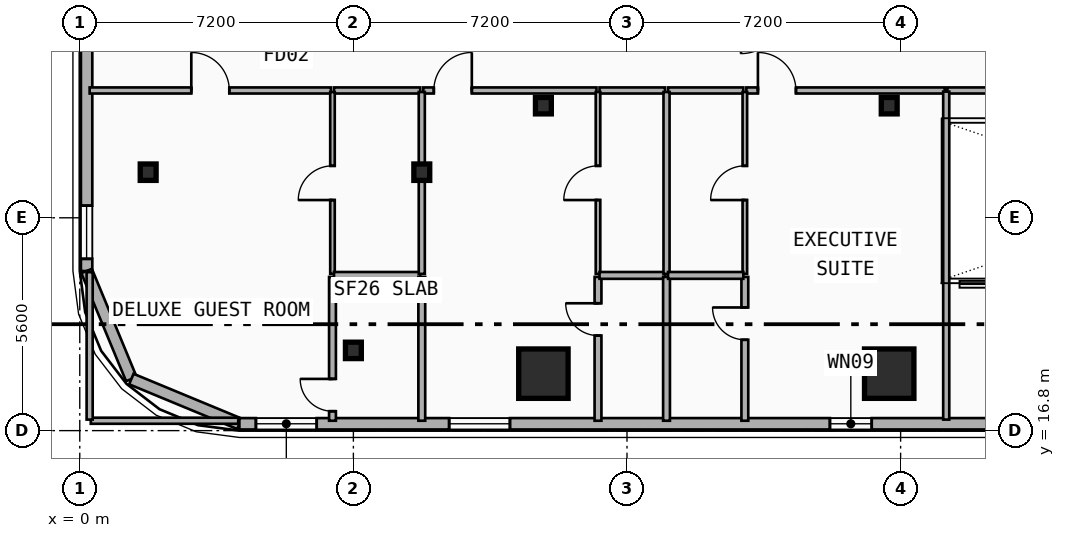
"""IFC4 building model, lengths in metres.
Left out: names, types, materials, properties, quantities, classifications, styles, units other than length and angle.
Written with IfcOpenShell. Run it as: python <this file> out.ifc"""

import sys

from ifc_helpers import new_model, si_unit, direction, frame, frame_2d, origin, origin_2d, place, context, subcontext, project, spatial, rectangle, i_section, extrude, element, fill, save


model = new_model("IFC4")
c1 = context("Model", 3, precision=1e-05, world=origin(), true_north=direction((0.0, 1.0)))
c2 = subcontext(c1, "Body", "Model", "MODEL_VIEW")
j1 = project(units=[si_unit("LENGTHUNIT", "METRE"), si_unit("PLANEANGLEUNIT", "RADIAN")], contexts=[c1])
p1 = place(None, origin())
s1 = spatial("IfcSite", under=j1, at=p1, CompositionType="ELEMENT")
p2 = place(p1, origin())
s2 = spatial("IfcBuilding", under=s1, at=p2, CompositionType="ELEMENT")
p3 = place(p2, frame((0.0, 0.0, 86.3)))
s3 = spatial("IfcBuildingStorey", under=s2, at=p3, CompositionType="ELEMENT", Elevation=86.3)
for number, where, z_axis, x_axis in (
    (1, (12.2, 25.35, 0.0), (0.0, 0.0, 1.0), (1.0, 0.0, 0.0)),
    (2, (21.3, 25.35, 0.0), (0.0, 0.0, 1.0), (1.0, 0.0, 0.0)),
):
    element("IfcColumn", number, at=place(p3, frame(where, z_axis=z_axis, x_axis=x_axis)), inside=s3, PredefinedType="COLUMN", context=c2, shape_type="SweptSolid", body=[
        extrude(i_section(OverallWidth=0.418, OverallDepth=0.432, WebThickness=0.035, FlangeThickness=0.056, FilletRadius=0.015, at=origin_2d()), origin(), (0.0, 0.0, 1.0), 3.5),
    ])
for number, where, z_axis, x_axis in (
    (3, (12.2, 18.407, 0.0), (0.0, -0.09, 0.996), (1.0, 0.0, 0.0)),
    (4, (21.3, 18.407, 0.0), (0.0, -0.09, 0.996), (1.0, 0.0, 0.0)),
):
    element("IfcColumn", number, at=place(p3, frame(where, z_axis=z_axis, x_axis=x_axis)), inside=s3, PredefinedType="COLUMN", context=c2, shape_type="SweptSolid", body=[
        extrude(rectangle(XDim=1.3, YDim=1.3, at=origin_2d()), origin(), (0.0, 0.0, 1.0), 3.514),
    ])
for number, where, z_axis, x_axis in (
    (5, (9.0, 23.6, 0.0), (0.0, 0.0, 1.0), (1.0, 0.0, 0.0)),
    (6, (1.8, 23.6, 0.0), (0.0, 0.0, 1.0), (1.0, 0.0, 0.0)),
):
    element("IfcColumn", number, at=place(p3, frame(where, z_axis=z_axis, x_axis=x_axis)), inside=s3, PredefinedType="COLUMN", context=c2, shape_type="SweptSolid", body=[
        extrude(i_section(OverallWidth=0.418, OverallDepth=0.432, WebThickness=0.035, FlangeThickness=0.056, FilletRadius=0.015, at=origin_2d()), origin(), (0.0, 0.0, 1.0), 3.5),
    ])
p4 = place(p3, frame((7.2, 19.008, 0.0), z_axis=(0.0, -0.079960777917, 0.996798010629), x_axis=(1.0, 0.0, 0.0)))
e7 = element("IfcColumn", 7, at=p4, inside=s3, PredefinedType="COLUMN", context=c2, shape_type="SweptSolid", body=[
    extrude(i_section(OverallWidth=0.418, OverallDepth=0.432, WebThickness=0.035, FlangeThickness=0.056, FilletRadius=0.015, at=origin_2d()), origin(), (0.0, 0.0, 1.0), 3.511),
])
p5 = place(p3, frame((0.18, 21.0, 0.0), z_axis=(0.0, 0.0, 1.0), x_axis=(0.0, 1.0, 0.0)))
e8 = element("IfcWall", 8, at=p5, inside=s3, PredefinedType="SOLIDWALL", context=c2, shape_type="SweptSolid", body=[
    extrude(rectangle(XDim=18.0, YDim=0.3, at=frame_2d((9.0, 0.0))), origin(), (0.0, 0.0, 1.0), 3.24),
])
p6 = place(p5, frame((7.47, 0.0, 0.48)))
e9 = element("IfcOpeningElement", 9, at=p6, cuts=e8, PredefinedType="OPENING", context=c2, shape_type="SweptSolid", body=[
    extrude(rectangle(XDim=1.4, YDim=1.8, at=frame_2d((0.7, 0.9))), frame((0.0, 0.16, 0.0), z_axis=(0.0, -1.0, 0.0), x_axis=(1.0, 0.0, 0.0)), (0.0, 0.0, 1.0), 0.32),
])
p7 = place(p5, frame((12.509, 0.0, 0.48)))
e10 = element("IfcOpeningElement", 10, at=p7, cuts=e8, PredefinedType="OPENING", context=c2, shape_type="SweptSolid", body=[
    extrude(rectangle(XDim=1.4, YDim=1.8, at=frame_2d((0.7, 0.9))), frame((0.0, 0.16, 0.0), z_axis=(0.0, -1.0, 0.0), x_axis=(1.0, 0.0, 0.0)), (0.0, 0.0, 1.0), 0.32),
])
p8 = place(p5, frame((0.32, 0.0, 0.65)))
e11 = element("IfcOpeningElement", 11, at=p8, cuts=e8, PredefinedType="OPENING", context=c2, shape_type="SweptSolid", body=[
    extrude(rectangle(XDim=1.4, YDim=1.8, at=frame_2d((0.7, 0.9))), frame((0.0, 0.16, 0.0), z_axis=(0.0, -1.0, 0.0), x_axis=(1.0, 0.0, 0.0)), (0.0, 0.0, 1.0), 0.32),
])
for number, where, z_axis, x_axis in (
    (12, (1.357, 18.157, 0.0), (0.0, 0.0, 1.0), (-0.383, 0.924, 0.0)),
    (13, (4.2, 16.98, 0.0), (0.0, 0.0, 1.0), (-0.924, 0.383, 0.0)),
):
    element("IfcWall", number, at=place(p3, frame(where, z_axis=z_axis, x_axis=x_axis)), inside=s3, PredefinedType="SOLIDWALL", context=c2, shape_type="SweptSolid", body=[
        extrude(rectangle(XDim=3.077, YDim=0.3, at=frame_2d((1.538, 0.0))), origin(), (0.0, 0.0, 1.0), 3.24),
    ])
p9 = place(p3, frame((53.4, 16.98, 0.0), z_axis=(0.0, 0.0, 1.0), x_axis=(-1.0, 0.0, 0.0)))
e14 = element("IfcWall", 14, at=p9, inside=s3, PredefinedType="SOLIDWALL", context=c2, shape_type="SweptSolid", body=[
    extrude(rectangle(XDim=49.2, YDim=0.3, at=frame_2d((24.6, 0.0))), origin(), (0.0, 0.0, 1.0), 3.24),
])
p10 = place(p9, frame((47.165, 0.0, 0.48)))
e15 = element("IfcOpeningElement", 15, at=p10, cuts=e14, PredefinedType="OPENING", context=c2, shape_type="SweptSolid", body=[
    extrude(rectangle(XDim=1.6, YDim=1.95, at=frame_2d((0.8, 0.975))), frame((0.0, 0.16, 0.0), z_axis=(0.0, -1.0, 0.0), x_axis=(1.0, 0.0, 0.0)), (0.0, 0.0, 1.0), 0.32),
])
p11 = place(p9, frame((42.08, 0.0, 0.8)))
e16 = element("IfcOpeningElement", 16, at=p11, cuts=e14, PredefinedType="OPENING", context=c2, shape_type="SweptSolid", body=[
    extrude(rectangle(XDim=1.6, YDim=1.95, at=frame_2d((0.8, 0.975))), frame((0.0, 0.16, 0.0), z_axis=(0.0, -1.0, 0.0), x_axis=(1.0, 0.0, 0.0)), (0.0, 0.0, 1.0), 0.32),
])
p12 = place(p9, frame((32.561, 0.0, 1.05)))
e17 = element("IfcOpeningElement", 17, at=p12, cuts=e14, PredefinedType="OPENING", context=c2, shape_type="SweptSolid", body=[
    extrude(rectangle(XDim=1.1, YDim=1.05, at=frame_2d((0.55, 0.525))), frame((0.0, 0.16, 0.0), z_axis=(0.0, -1.0, 0.0), x_axis=(1.0, 0.0, 0.0)), (0.0, 0.0, 1.0), 0.32),
])
p13 = place(p9, frame((15.189, 0.0, 0.34)))
e18 = element("IfcOpeningElement", 18, at=p13, cuts=e14, PredefinedType="OPENING", context=c2, shape_type="SweptSolid", body=[
    extrude(rectangle(XDim=1.4, YDim=1.8, at=frame_2d((0.7, 0.9))), frame((0.0, 0.16, 0.0), z_axis=(0.0, -1.0, 0.0), x_axis=(1.0, 0.0, 0.0)), (0.0, 0.0, 1.0), 0.32),
])
p14 = place(p9, frame((5.52, 0.0, 0.8)))
e19 = element("IfcOpeningElement", 19, at=p14, cuts=e14, PredefinedType="OPENING", context=c2, shape_type="SweptSolid", body=[
    extrude(rectangle(XDim=1.6, YDim=1.95, at=frame_2d((0.8, 0.975))), frame((0.0, 0.16, 0.0), z_axis=(0.0, -1.0, 0.0), x_axis=(1.0, 0.0, 0.0)), (0.0, 0.0, 1.0), 0.32),
])
p15 = place(p9, frame((0.435, 0.0, 0.48)))
e20 = element("IfcOpeningElement", 20, at=p15, cuts=e14, PredefinedType="OPENING", context=c2, shape_type="SweptSolid", body=[
    extrude(rectangle(XDim=1.6, YDim=1.95, at=frame_2d((0.8, 0.975))), frame((0.0, 0.16, 0.0), z_axis=(0.0, -1.0, 0.0), x_axis=(1.0, 0.0, 0.0)), (0.0, 0.0, 1.0), 0.32),
])
p16 = place(p3, frame((0.26, 25.75, 0.0), z_axis=(0.0, 0.0, 1.0), x_axis=(1.0, 0.0, 0.0)))
e21 = element("IfcWall", 21, at=p16, inside=s3, PredefinedType="PARTITIONING", context=c2, shape_type="SweptSolid", body=[
    extrude(rectangle(XDim=6.35, YDim=0.16, at=frame_2d((3.175, 0.0))), origin(), (0.0, 0.0, 1.0), 2.57),
])
p17 = place(p16, frame((2.675, 0.0, 0.0)))
e22 = element("IfcOpeningElement", 22, at=p17, cuts=e21, PredefinedType="OPENING", context=c2, shape_type="SweptSolid", body=[
    extrude(rectangle(XDim=1.0, YDim=2.15, at=frame_2d((0.5, 1.075))), frame((0.0, 0.09, 0.0), z_axis=(0.0, -1.0, 0.0), x_axis=(1.0, 0.0, 0.0)), (0.0, 0.0, 1.0), 0.18),
])
p18 = place(p3, frame((6.69, 25.75, 0.0), z_axis=(0.0, 0.0, 1.0), x_axis=(1.0, 0.0, 0.0)))
e23 = element("IfcWall", 23, at=p18, inside=s3, PredefinedType="PARTITIONING", context=c2, shape_type="SweptSolid", body=[
    extrude(rectangle(XDim=2.27, YDim=0.16, at=frame_2d((1.135, 0.0))), origin(), (0.0, 0.0, 1.0), 2.57),
])
p19 = place(p3, frame((9.04, 25.75, 0.0), z_axis=(0.0, 0.0, 1.0), x_axis=(1.0, 0.0, 0.0)))
e24 = element("IfcWall", 24, at=p19, inside=s3, PredefinedType="PARTITIONING", context=c2, shape_type="SweptSolid", body=[
    extrude(rectangle(XDim=4.557, YDim=0.16, at=frame_2d((2.278, 0.0))), origin(), (0.0, 0.0, 1.0), 2.31),
])
p20 = place(p19, frame((0.277, 0.0, 0.0)))
e25 = element("IfcOpeningElement", 25, at=p20, cuts=e24, PredefinedType="OPENING", context=c2, shape_type="SweptSolid", body=[
    extrude(rectangle(XDim=1.0, YDim=2.15, at=frame_2d((0.5, 1.075))), frame((0.0, 0.09, 0.0), z_axis=(0.0, -1.0, 0.0), x_axis=(1.0, 0.0, 0.0)), (0.0, 0.0, 1.0), 0.18),
])
p21 = place(p3, frame((13.677, 25.75, 0.0), z_axis=(0.0, 0.0, 1.0), x_axis=(1.0, 0.0, 0.0)))
e26 = element("IfcWall", 26, at=p21, inside=s3, PredefinedType="PARTITIONING", context=c2, shape_type="SweptSolid", body=[
    extrude(rectangle(XDim=1.723, YDim=0.16, at=frame_2d((0.861, 0.0))), origin(), (0.0, 0.0, 1.0), 3.24),
])
p22 = place(p3, frame((17.541, 25.75, 0.0), z_axis=(0.0, 0.0, 1.0), x_axis=(1.0, 0.0, 0.0)))
e27 = element("IfcWall", 27, at=p22, inside=s3, PredefinedType="PARTITIONING", context=c2, shape_type="SweptSolid", body=[
    extrude(rectangle(XDim=5.219, YDim=0.16, at=frame_2d((2.609, 0.0))), origin(), (0.0, 0.0, 1.0), 2.31),
])
p23 = place(p22, frame((0.304, 0.0, 0.0)))
e28 = element("IfcOpeningElement", 28, at=p23, cuts=e27, PredefinedType="OPENING", context=c2, shape_type="SweptSolid", body=[
    extrude(rectangle(XDim=1.0, YDim=2.15, at=frame_2d((0.5, 1.075))), frame((0.0, 0.09, 0.0), z_axis=(0.0, -1.0, 0.0), x_axis=(1.0, 0.0, 0.0)), (0.0, 0.0, 1.0), 0.18),
])
p24 = place(p3, frame((15.48, 25.75, 0.0), z_axis=(0.0, 0.0, 1.0), x_axis=(1.0, 0.0, 0.0)))
e29 = element("IfcWall", 29, at=p24, inside=s3, PredefinedType="PARTITIONING", context=c2, shape_type="SweptSolid", body=[
    extrude(rectangle(XDim=1.981, YDim=0.16, at=frame_2d((0.99, 0.0))), origin(), (0.0, 0.0, 1.0), 3.24),
])
p25 = place(p3, frame((6.65, 17.06, 0.0), z_axis=(0.0, 0.0, 1.0), x_axis=(0.0, 1.0, 0.0)))
e30 = element("IfcWall", 30, at=p25, inside=s3, PredefinedType="PLUMBINGWALL", context=c2, shape_type="SweptSolid", body=[
    extrude(rectangle(XDim=3.784, YDim=0.18, at=frame_2d((1.892, 0.0))), origin(), (0.0, 0.0, 1.0), 2.57),
])
p26 = place(p25, frame((0.25, 0.0, 0.0)))
e31 = element("IfcOpeningElement", 31, at=p26, cuts=e30, PredefinedType="OPENING", context=c2, shape_type="SweptSolid", body=[
    extrude(rectangle(XDim=0.85, YDim=2.1, at=frame_2d((0.425, 1.05))), frame((0.0, 0.1, 0.0), z_axis=(0.0, -1.0, 0.0), x_axis=(1.0, 0.0, 0.0)), (0.0, 0.0, 1.0), 0.2),
])
p27 = place(p3, frame((6.65, 20.924, 0.0), z_axis=(0.0, 0.0, 1.0), x_axis=(0.0, 1.0, 0.0)))
e32 = element("IfcWall", 32, at=p27, inside=s3, PredefinedType="PARTITIONING", context=c2, shape_type="SweptSolid", body=[
    extrude(rectangle(XDim=4.786, YDim=0.12, at=frame_2d((2.393, 0.0))), origin(), (0.0, 0.0, 1.0), 2.57),
])
p28 = place(p27, frame((1.943, 0.0, 0.0)))
e33 = element("IfcOpeningElement", 33, at=p28, cuts=e32, PredefinedType="OPENING", context=c2, shape_type="SweptSolid", body=[
    extrude(rectangle(XDim=0.9, YDim=2.1, at=frame_2d((0.45, 1.05))), frame((0.0, 0.07, 0.0), z_axis=(0.0, -1.0, 0.0), x_axis=(1.0, 0.0, 0.0)), (0.0, 0.0, 1.0), 0.14),
])
p29 = place(p3, frame((6.69, 20.884, 0.0), z_axis=(0.0, 0.0, 1.0), x_axis=(1.0, 0.0, 0.0)))
e34 = element("IfcWall", 34, at=p29, inside=s3, PredefinedType="PLUMBINGWALL", context=c2, shape_type="SweptSolid", body=[
    extrude(rectangle(XDim=2.27, YDim=0.18, at=frame_2d((1.135, 0.0))), origin(), (0.0, 0.0, 1.0), 2.57),
])
p30 = place(p3, frame((9.0, 17.06, 0.0), z_axis=(0.0, 0.0, 1.0), x_axis=(0.0, 1.0, 0.0)))
e35 = element("IfcWall", 35, at=p30, inside=s3, PredefinedType="PLUMBINGWALL", context=c2, shape_type="SweptSolid", body=[
    extrude(rectangle(XDim=3.784, YDim=0.18, at=frame_2d((1.892, 0.0))), origin(), (0.0, 0.0, 1.0), 2.72),
])
p31 = place(p3, frame((9.0, 20.924, 0.0), z_axis=(0.0, 0.0, 1.0), x_axis=(0.0, 1.0, 0.0)))
e36 = element("IfcWall", 36, at=p31, inside=s3, PredefinedType="PARTITIONING", context=c2, shape_type="SweptSolid", body=[
    extrude(rectangle(XDim=4.786, YDim=0.16, at=frame_2d((2.393, 0.0))), origin(), (0.0, 0.0, 1.0), 2.72),
])
p32 = place(p3, frame((13.637, 17.06, 0.0), z_axis=(0.0, 0.0, 1.0), x_axis=(0.0, 1.0, 0.0)))
e37 = element("IfcWall", 37, at=p32, inside=s3, PredefinedType="PLUMBINGWALL", context=c2, shape_type="SweptSolid", body=[
    extrude(rectangle(XDim=3.784, YDim=0.18, at=frame_2d((1.892, 0.0))), origin(), (0.0, 0.0, 1.0), 2.82),
])
p33 = place(p32, frame((2.241, 0.0, 0.0)))
e38 = element("IfcOpeningElement", 38, at=p33, cuts=e37, PredefinedType="OPENING", context=c2, shape_type="SweptSolid", body=[
    extrude(rectangle(XDim=0.85, YDim=2.1, at=frame_2d((0.425, 1.05))), frame((0.0, 0.1, 0.0), z_axis=(0.0, -1.0, 0.0), x_axis=(1.0, 0.0, 0.0)), (0.0, 0.0, 1.0), 0.2),
])
p34 = place(p3, frame((13.637, 20.924, 0.0), z_axis=(0.0, 0.0, 1.0), x_axis=(0.0, 1.0, 0.0)))
e39 = element("IfcWall", 39, at=p34, inside=s3, PredefinedType="PARTITIONING", context=c2, shape_type="SweptSolid", body=[
    extrude(rectangle(XDim=4.786, YDim=0.12, at=frame_2d((2.393, 0.0))), origin(), (0.0, 0.0, 1.0), 2.72),
])
p35 = place(p34, frame((1.943, 0.0, 0.0)))
e40 = element("IfcOpeningElement", 40, at=p35, cuts=e39, PredefinedType="OPENING", context=c2, shape_type="SweptSolid", body=[
    extrude(rectangle(XDim=0.9, YDim=2.1, at=frame_2d((0.45, 1.05))), frame((0.0, 0.07, 0.0), z_axis=(0.0, -1.0, 0.0), x_axis=(1.0, 0.0, 0.0)), (0.0, 0.0, 1.0), 0.14),
])
p36 = place(p3, frame((13.677, 20.884, 0.0), z_axis=(0.0, 0.0, 1.0), x_axis=(1.0, 0.0, 0.0)))
e41 = element("IfcWall", 41, at=p36, inside=s3, PredefinedType="PLUMBINGWALL", context=c2, shape_type="SweptSolid", body=[
    extrude(rectangle(XDim=1.723, YDim=0.18, at=frame_2d((0.861, 0.0))), origin(), (0.0, 0.0, 1.0), 2.87),
])
p37 = place(p3, frame((15.44, 17.06, 0.0), z_axis=(0.0, 0.0, 1.0), x_axis=(0.0, 1.0, 0.0)))
e42 = element("IfcWall", 42, at=p37, inside=s3, PredefinedType="PLUMBINGWALL", context=c2, shape_type="SweptSolid", body=[
    extrude(rectangle(XDim=3.784, YDim=0.18, at=frame_2d((1.892, 0.0))), origin(), (0.0, 0.0, 1.0), 2.82),
])
p38 = place(p3, frame((15.44, 20.924, 0.0), z_axis=(0.0, 0.0, 1.0), x_axis=(0.0, 1.0, 0.0)))
e43 = element("IfcWall", 43, at=p38, inside=s3, PredefinedType="PARTITIONING", context=c2, shape_type="SweptSolid", body=[
    extrude(rectangle(XDim=4.786, YDim=0.16, at=frame_2d((2.393, 0.0))), origin(), (0.0, 0.0, 1.0), 2.72),
])
p39 = place(p3, frame((17.501, 17.06, 0.0), z_axis=(0.0, 0.0, 1.0), x_axis=(0.0, 1.0, 0.0)))
e44 = element("IfcWall", 44, at=p39, inside=s3, PredefinedType="PLUMBINGWALL", context=c2, shape_type="SweptSolid", body=[
    extrude(rectangle(XDim=3.784, YDim=0.18, at=frame_2d((1.892, 0.0))), origin(), (0.0, 0.0, 1.0), 2.82),
])
p40 = place(p39, frame((2.131, 0.0, 0.0)))
e45 = element("IfcOpeningElement", 45, at=p40, cuts=e44, PredefinedType="OPENING", context=c2, shape_type="SweptSolid", body=[
    extrude(rectangle(XDim=0.85, YDim=2.1, at=frame_2d((0.425, 1.05))), frame((0.0, 0.1, 0.0), z_axis=(0.0, -1.0, 0.0), x_axis=(1.0, 0.0, 0.0)), (0.0, 0.0, 1.0), 0.2),
])
p41 = place(p3, frame((17.501, 20.924, 0.0), z_axis=(0.0, 0.0, 1.0), x_axis=(0.0, 1.0, 0.0)))
e46 = element("IfcWall", 46, at=p41, inside=s3, PredefinedType="PARTITIONING", context=c2, shape_type="SweptSolid", body=[
    extrude(rectangle(XDim=4.786, YDim=0.12, at=frame_2d((2.393, 0.0))), origin(), (0.0, 0.0, 1.0), 2.72),
])
p42 = place(p41, frame((1.943, 0.0, 0.0)))
e47 = element("IfcOpeningElement", 47, at=p42, cuts=e46, PredefinedType="OPENING", context=c2, shape_type="SweptSolid", body=[
    extrude(rectangle(XDim=0.9, YDim=2.1, at=frame_2d((0.45, 1.05))), frame((0.0, 0.07, 0.0), z_axis=(0.0, -1.0, 0.0), x_axis=(1.0, 0.0, 0.0)), (0.0, 0.0, 1.0), 0.14),
])
p43 = place(p3, frame((15.48, 20.884, 0.0), z_axis=(0.0, 0.0, 1.0), x_axis=(1.0, 0.0, 0.0)))
e48 = element("IfcWall", 48, at=p43, inside=s3, PredefinedType="PLUMBINGWALL", context=c2, shape_type="SweptSolid", body=[
    extrude(rectangle(XDim=1.981, YDim=0.18, at=frame_2d((0.99, 0.0))), origin(), (0.0, 0.0, 1.0), 2.87),
])
p44 = place(p3, frame((22.83, 25.75, 0.0), z_axis=(0.0, 0.0, 1.0), x_axis=(1.0, 0.0, 0.0)))
e49 = element("IfcWall", 49, at=p44, inside=s3, PredefinedType="PARTITIONING", context=c2, shape_type="SweptSolid", body=[
    extrude(rectangle(XDim=11.94, YDim=0.16, at=frame_2d((5.97, 0.0))), origin(), (0.0, 0.0, 1.0), 3.24),
])
for number, where, z_axis, x_axis in (
    (50, (0.29, 17.06, 0.0), (0.0, 0.0, 1.0), (1.0, 0.0, 0.0)),
    (51, (0.26, 17.09, 0.0), (0.0, 0.0, 1.0), (0.0, 1.0, 0.0)),
):
    element("IfcWall", number, at=place(p3, frame(where, z_axis=z_axis, x_axis=x_axis)), inside=s3, PredefinedType="PARTITIONING", context=c2, shape_type="SweptSolid", body=[
        extrude(rectangle(XDim=3.88, YDim=0.16, at=frame_2d((1.94, 0.0))), origin(), (0.0, 0.0, 1.0), 3.24),
    ])
p45 = place(p3, frame((22.8, 17.09, 0.0), z_axis=(0.0, 0.0, 1.0), x_axis=(0.0, 1.0, 0.0)))
e52 = element("IfcWall", 52, at=p45, inside=s3, PredefinedType="PARTITIONING", context=c2, shape_type="SweptSolid", body=[
    extrude(rectangle(XDim=8.63, YDim=0.16, at=frame_2d((4.315, 0.0))), origin(), (0.0, 0.0, 1.0), 2.68),
])
p46 = place(p8, origin())
e53 = element("IfcWindow", 53, at=p46, inside=s3, PartitioningType="SINGLE_PANEL", PredefinedType="WINDOW", context=c2, shape_type="SweptSolid", body=[
    extrude(rectangle(XDim=1.4, YDim=1.8, at=frame_2d((0.7, 0.9))), frame((0.0, 0.03, 0.0), z_axis=(0.0, -1.0, 0.0), x_axis=(1.0, 0.0, 0.0)), (0.0, 0.0, 1.0), 0.06),
])
fill(e11, e53)
p47 = place(p10, origin())
e54 = element("IfcWindow", 54, at=p47, inside=s3, PartitioningType="SINGLE_PANEL", PredefinedType="WINDOW", context=c2, shape_type="SweptSolid", body=[
    extrude(rectangle(XDim=1.6, YDim=1.95, at=frame_2d((0.8, 0.975))), frame((0.0, 0.03, 0.0), z_axis=(0.0, -1.0, 0.0), x_axis=(1.0, 0.0, 0.0)), (0.0, 0.0, 1.0), 0.06),
])
fill(e15, e54)
p48 = place(p11, origin())
e55 = element("IfcWindow", 55, at=p48, inside=s3, PartitioningType="SINGLE_PANEL", PredefinedType="WINDOW", context=c2, shape_type="SweptSolid", body=[
    extrude(rectangle(XDim=1.6, YDim=1.95, at=frame_2d((0.8, 0.975))), frame((0.0, 0.03, 0.0), z_axis=(0.0, -1.0, 0.0), x_axis=(1.0, 0.0, 0.0)), (0.0, 0.0, 1.0), 0.06),
])
fill(e16, e55)
p49 = place(p12, origin())
e56 = element("IfcWindow", 56, at=p49, inside=s3, PartitioningType="SINGLE_PANEL", PredefinedType="WINDOW", context=c2, shape_type="SweptSolid", body=[
    extrude(rectangle(XDim=1.1, YDim=1.05, at=frame_2d((0.55, 0.525))), frame((0.0, 0.03, 0.0), z_axis=(0.0, -1.0, 0.0), x_axis=(1.0, 0.0, 0.0)), (0.0, 0.0, 1.0), 0.06),
])
fill(e17, e56)
p50 = place(p17, origin())
e57 = element("IfcDoor", 57, at=p50, inside=s3, OperationType="SINGLE_SWING_LEFT", PredefinedType="DOOR", context=c2, shape_type="SweptSolid", body=[
    extrude(rectangle(XDim=1.0, YDim=2.15, at=frame_2d((0.5, 1.075))), frame((0.0, 0.025, 0.0), z_axis=(0.0, -1.0, 0.0), x_axis=(1.0, 0.0, 0.0)), (0.0, 0.0, 1.0), 0.05),
])
fill(e22, e57)
p51 = place(p20, origin())
e58 = element("IfcDoor", 58, at=p51, inside=s3, OperationType="SINGLE_SWING_RIGHT", PredefinedType="DOOR", context=c2, shape_type="SweptSolid", body=[
    extrude(rectangle(XDim=1.0, YDim=2.15, at=frame_2d((0.5, 1.075))), frame((0.0, 0.025, 0.0), z_axis=(0.0, -1.0, 0.0), x_axis=(1.0, 0.0, 0.0)), (0.0, 0.0, 1.0), 0.05),
])
fill(e25, e58)
p52 = place(p23, origin())
e59 = element("IfcDoor", 59, at=p52, inside=s3, OperationType="SINGLE_SWING_LEFT", PredefinedType="DOOR", context=c2, shape_type="SweptSolid", body=[
    extrude(rectangle(XDim=1.0, YDim=2.15, at=frame_2d((0.5, 1.075))), frame((0.0, 0.025, 0.0), z_axis=(0.0, -1.0, 0.0), x_axis=(1.0, 0.0, 0.0)), (0.0, 0.0, 1.0), 0.05),
])
fill(e28, e59)
p53 = place(p26, origin())
e60 = element("IfcDoor", 60, at=p53, inside=s3, OperationType="SINGLE_SWING_RIGHT", PredefinedType="DOOR", context=c2, shape_type="SweptSolid", body=[
    extrude(rectangle(XDim=0.85, YDim=2.1, at=frame_2d((0.425, 1.05))), frame((0.0, 0.025, 0.0), z_axis=(0.0, -1.0, 0.0), x_axis=(1.0, 0.0, 0.0)), (0.0, 0.0, 1.0), 0.05),
])
fill(e31, e60)
p54 = place(p28, origin())
e61 = element("IfcDoor", 61, at=p54, inside=s3, OperationType="SINGLE_SWING_LEFT", PredefinedType="DOOR", context=c2, shape_type="SweptSolid", body=[
    extrude(rectangle(XDim=0.9, YDim=2.1, at=frame_2d((0.45, 1.05))), frame((0.0, 0.025, 0.0), z_axis=(0.0, -1.0, 0.0), x_axis=(1.0, 0.0, 0.0)), (0.0, 0.0, 1.0), 0.05),
])
fill(e33, e61)
p55 = place(p33, origin())
e62 = element("IfcDoor", 62, at=p55, inside=s3, OperationType="SINGLE_SWING_RIGHT", PredefinedType="DOOR", context=c2, shape_type="SweptSolid", body=[
    extrude(rectangle(XDim=0.85, YDim=2.1, at=frame_2d((0.425, 1.05))), frame((0.0, 0.025, 0.0), z_axis=(0.0, -1.0, 0.0), x_axis=(1.0, 0.0, 0.0)), (0.0, 0.0, 1.0), 0.05),
])
fill(e38, e62)
p56 = place(p35, origin())
e63 = element("IfcDoor", 63, at=p56, inside=s3, OperationType="SINGLE_SWING_LEFT", PredefinedType="DOOR", context=c2, shape_type="SweptSolid", body=[
    extrude(rectangle(XDim=0.9, YDim=2.1, at=frame_2d((0.45, 1.05))), frame((0.0, 0.025, 0.0), z_axis=(0.0, -1.0, 0.0), x_axis=(1.0, 0.0, 0.0)), (0.0, 0.0, 1.0), 0.05),
])
fill(e40, e63)
p57 = place(p40, origin())
e64 = element("IfcDoor", 64, at=p57, inside=s3, OperationType="SINGLE_SWING_RIGHT", PredefinedType="DOOR", context=c2, shape_type="SweptSolid", body=[
    extrude(rectangle(XDim=0.85, YDim=2.1, at=frame_2d((0.425, 1.05))), frame((0.0, 0.025, 0.0), z_axis=(0.0, -1.0, 0.0), x_axis=(1.0, 0.0, 0.0)), (0.0, 0.0, 1.0), 0.05),
])
fill(e45, e64)
p58 = place(p42, origin())
e65 = element("IfcDoor", 65, at=p58, inside=s3, OperationType="SINGLE_SWING_LEFT", PredefinedType="DOOR", context=c2, shape_type="SweptSolid", body=[
    extrude(rectangle(XDim=0.9, YDim=2.1, at=frame_2d((0.45, 1.05))), frame((0.0, 0.025, 0.0), z_axis=(0.0, -1.0, 0.0), x_axis=(1.0, 0.0, 0.0)), (0.0, 0.0, 1.0), 0.05),
])
fill(e47, e65)
save(model, sys.argv[1])
